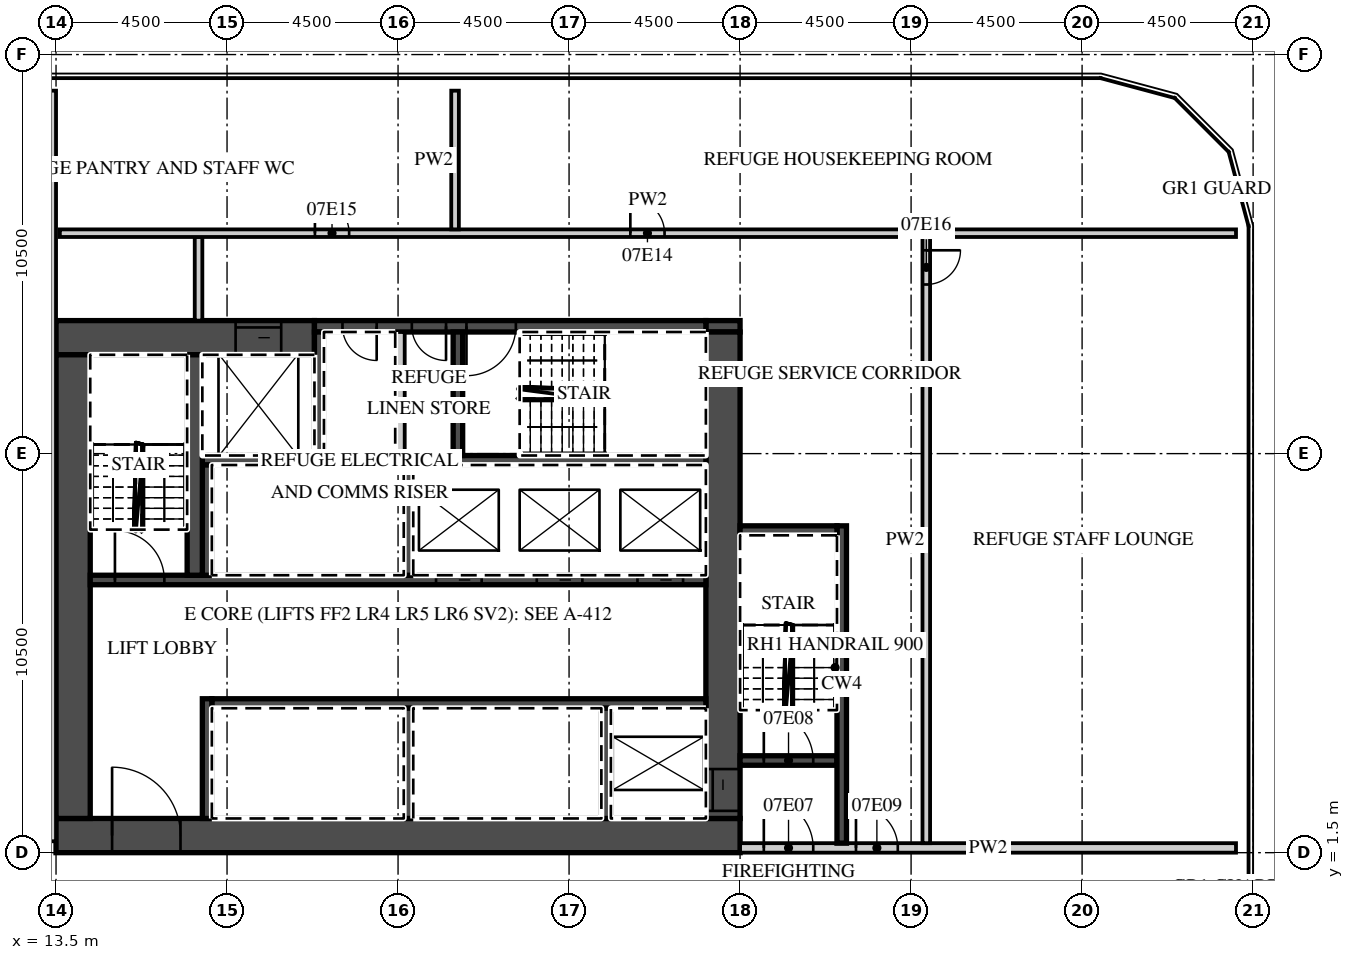
"""IFC4 building model, lengths in metres.
Left out: names, types, materials, properties, quantities, classifications, styles, units other than length and angle.
Written with IfcOpenShell. Run it as: python <this file> out.ifc"""

import sys

from ifc_helpers import new_model, si_unit, direction, frame, frame_2d, origin, place, context, subcontext, project, spatial, rectangle, extrude, element, fill, save


model = new_model("IFC4")
c1 = context("Model", 3, precision=1e-05, world=origin(), true_north=direction((0.0, 1.0)))
c2 = subcontext(c1, "Body", "Model", "MODEL_VIEW")
j1 = project(units=[si_unit("LENGTHUNIT", "METRE"), si_unit("PLANEANGLEUNIT", "RADIAN")], contexts=[c1])
p1 = place(None, origin())
s1 = spatial("IfcSite", under=j1, at=p1, CompositionType="ELEMENT")
p2 = place(p1, origin())
s2 = spatial("IfcBuilding", under=s1, at=p2, CompositionType="ELEMENT")
p3 = place(p2, frame((0.0, 0.0, 47.0)))
s3 = spatial("IfcBuildingStorey", under=s2, at=p3, CompositionType="ELEMENT", Elevation=47.0)
p4 = place(p3, frame((13.5, 1.95, 0.0), z_axis=(0.0, 0.0, 1.0), x_axis=(1.0, 0.0, 0.0)))
e1 = element("IfcWall", 1, at=p4, inside=s3, PredefinedType="SHEAR", context=c2, shape_type="SweptSolid", body=[
    extrude(rectangle(XDim=18.0, YDim=0.9, at=frame_2d((9.0, 0.0))), origin(), (0.0, 0.0, 1.0), 5.6),
])
p5 = place(p4, frame((1.475, 0.0, 0.0)))
e2 = element("IfcOpeningElement", 2, at=p5, cuts=e1, PredefinedType="OPENING", context=c2, shape_type="SweptSolid", body=[
    extrude(rectangle(XDim=1.8, YDim=2.1, at=frame_2d((0.9, 1.05))), frame((0.0, 0.46, 0.0), z_axis=(0.0, -1.0, 0.0), x_axis=(1.0, 0.0, 0.0)), (0.0, 0.0, 1.0), 0.92),
])
p6 = place(p3, frame((13.5, 15.05, 0.0), z_axis=(0.0, 0.0, 1.0), x_axis=(1.0, 0.0, 0.0)))
e3 = element("IfcWall", 3, at=p6, inside=s3, PredefinedType="SHEAR", context=c2, shape_type="SweptSolid", body=[
    extrude(rectangle(XDim=6.8, YDim=0.9, at=frame_2d((3.4, 0.0))), origin(), (0.0, 0.0, 1.0), 5.6),
])
p7 = place(p6, frame((4.725, 0.0, 0.0)))
e4 = element("IfcOpeningElement", 4, at=p7, cuts=e3, PredefinedType="OPENING", context=c2, shape_type="SweptSolid", body=[
    extrude(rectangle(XDim=1.2, YDim=2.1, at=frame_2d((0.6, 1.05))), frame((0.0, 0.46, 0.0), z_axis=(0.0, -1.0, 0.0), x_axis=(1.0, 0.0, 0.0)), (0.0, 0.0, 1.0), 0.92),
])
p8 = place(p3, frame((30.6, 15.35, 0.0), z_axis=(0.0, 0.0, 1.0), x_axis=(1.0, 0.0, 0.0)))
e5 = element("IfcWall", 5, at=p8, inside=s3, PredefinedType="SHEAR", context=c2, shape_type="SweptSolid", body=[
    extrude(rectangle(XDim=0.9, YDim=0.3, at=frame_2d((0.45, 0.0))), origin(), (0.0, 0.0, 1.0), 5.6),
])
p9 = place(p3, frame((20.3, 15.35, 0.0), z_axis=(0.0, 0.0, 1.0), x_axis=(1.0, 0.0, 0.0)))
e6 = element("IfcWall", 6, at=p9, inside=s3, PredefinedType="SHEAR", context=c2, shape_type="SweptSolid", body=[
    extrude(rectangle(XDim=10.3, YDim=0.3, at=frame_2d((5.15, 0.0))), origin(), (0.0, 0.0, 1.0), 5.6),
])
p10 = place(p9, frame((4.0, 0.0, 0.0)))
e7 = element("IfcOpeningElement", 7, at=p10, cuts=e6, PredefinedType="OPENING", context=c2, shape_type="SweptSolid", body=[
    extrude(rectangle(XDim=1.3, YDim=2.1, at=frame_2d((0.65, 1.05))), frame((0.0, 0.16, 0.0), z_axis=(0.0, -1.0, 0.0), x_axis=(1.0, 0.0, 0.0)), (0.0, 0.0, 1.0), 0.32),
])
p11 = place(p9, frame((2.562, 0.0, 0.0)))
e8 = element("IfcOpeningElement", 8, at=p11, cuts=e6, PredefinedType="OPENING", context=c2, shape_type="SweptSolid", body=[
    extrude(rectangle(XDim=0.9, YDim=2.1, at=frame_2d((0.45, 1.05))), frame((0.0, 0.16, 0.0), z_axis=(0.0, -1.0, 0.0), x_axis=(1.0, 0.0, 0.0)), (0.0, 0.0, 1.0), 0.32),
])
p12 = place(p9, frame((0.738, 0.0, 0.0)))
e9 = element("IfcOpeningElement", 9, at=p12, cuts=e6, PredefinedType="OPENING", context=c2, shape_type="SweptSolid", body=[
    extrude(rectangle(XDim=0.9, YDim=2.1, at=frame_2d((0.45, 1.05))), frame((0.0, 0.16, 0.0), z_axis=(0.0, -1.0, 0.0), x_axis=(1.0, 0.0, 0.0)), (0.0, 0.0, 1.0), 0.32),
])
p13 = place(p3, frame((31.05, 2.4, 0.0), z_axis=(0.0, 0.0, 1.0), x_axis=(0.0, 1.0, 0.0)))
e10 = element("IfcWall", 10, at=p13, inside=s3, PredefinedType="SHEAR", context=c2, shape_type="SweptSolid", body=[
    extrude(rectangle(XDim=12.8, YDim=0.9, at=frame_2d((6.4, 0.0))), origin(), (0.0, 0.0, 1.0), 5.6),
])
p14 = place(p13, frame((0.2, 0.0, 0.0)))
e11 = element("IfcOpeningElement", 11, at=p14, cuts=e10, PredefinedType="OPENING", context=c2, shape_type="SweptSolid", body=[
    extrude(rectangle(XDim=1.1, YDim=2.1, at=frame_2d((0.55, 1.05))), frame((0.0, 0.46, 0.0), z_axis=(0.0, -1.0, 0.0), x_axis=(1.0, 0.0, 0.0)), (0.0, 0.0, 1.0), 0.92),
])
p15 = place(p3, frame((13.95, 2.4, 0.0), z_axis=(0.0, 0.0, 1.0), x_axis=(0.0, 1.0, 0.0)))
e12 = element("IfcWall", 12, at=p15, inside=s3, PredefinedType="SHEAR", context=c2, shape_type="SweptSolid", body=[
    extrude(rectangle(XDim=12.2, YDim=0.9, at=frame_2d((6.1, 0.0))), origin(), (0.0, 0.0, 1.0), 5.6),
])
p16 = place(p3, frame((17.6, 5.425, 0.0), z_axis=(0.0, 0.0, 1.0), x_axis=(1.0, 0.0, 0.0)))
e13 = element("IfcWall", 13, at=p16, inside=s3, PredefinedType="SHEAR", context=c2, shape_type="SweptSolid", body=[
    extrude(rectangle(XDim=13.0, YDim=0.25, at=frame_2d((6.5, 0.0))), origin(), (0.0, 0.0, 1.0), 5.6),
])
p17 = place(p3, frame((17.475, 2.4, 0.0), z_axis=(0.0, 0.0, 1.0), x_axis=(0.0, 1.0, 0.0)))
e14 = element("IfcWall", 14, at=p17, inside=s3, PredefinedType="SHEAR", context=c2, shape_type="SweptSolid", body=[
    extrude(rectangle(XDim=3.15, YDim=0.25, at=frame_2d((1.575, 0.0))), origin(), (0.0, 0.0, 1.0), 5.6),
])
for number, where, z_axis, x_axis in (
    (15, (27.975, 2.4, 0.0), (0.0, 0.0, 1.0), (0.0, 1.0, 0.0)),
    (16, (22.775, 2.4, 0.0), (0.0, 0.0, 1.0), (0.0, 1.0, 0.0)),
):
    element("IfcWall", number, at=place(p3, frame(where, z_axis=z_axis, x_axis=x_axis)), inside=s3, PredefinedType="SHEAR", context=c2, shape_type="SweptSolid", body=[
        extrude(rectangle(XDim=2.9, YDim=0.25, at=frame_2d((1.45, 0.0))), origin(), (0.0, 0.0, 1.0), 5.6),
    ])
p18 = place(p3, frame((14.4, 8.675, 0.0), z_axis=(0.0, 0.0, 1.0), x_axis=(1.0, 0.0, 0.0)))
e17 = element("IfcWall", 17, at=p18, inside=s3, PredefinedType="SHEAR", context=c2, shape_type="SweptSolid", body=[
    extrude(rectangle(XDim=16.2, YDim=0.25, at=frame_2d((8.1, 0.0))), origin(), (0.0, 0.0, 1.0), 5.6),
])
p19 = place(p18, frame((14.4, 0.0, 0.0)))
e18 = element("IfcOpeningElement", 18, at=p19, cuts=e17, PredefinedType="OPENING", context=c2, shape_type="SweptSolid", body=[
    extrude(rectangle(XDim=1.2, YDim=2.1, at=frame_2d((0.6, 1.05))), frame((0.0, 0.135, 0.0), z_axis=(0.0, -1.0, 0.0), x_axis=(1.0, 0.0, 0.0)), (0.0, 0.0, 1.0), 0.27),
])
p20 = place(p18, frame((11.75, 0.0, 0.0)))
e19 = element("IfcOpeningElement", 19, at=p20, cuts=e17, PredefinedType="OPENING", context=c2, shape_type="SweptSolid", body=[
    extrude(rectangle(XDim=1.2, YDim=2.1, at=frame_2d((0.6, 1.05))), frame((0.0, 0.135, 0.0), z_axis=(0.0, -1.0, 0.0), x_axis=(1.0, 0.0, 0.0)), (0.0, 0.0, 1.0), 0.27),
])
p21 = place(p18, frame((9.1, 0.0, 0.0)))
e20 = element("IfcOpeningElement", 20, at=p21, cuts=e17, PredefinedType="OPENING", context=c2, shape_type="SweptSolid", body=[
    extrude(rectangle(XDim=1.2, YDim=2.1, at=frame_2d((0.6, 1.05))), frame((0.0, 0.135, 0.0), z_axis=(0.0, -1.0, 0.0), x_axis=(1.0, 0.0, 0.0)), (0.0, 0.0, 1.0), 0.27),
])
p22 = place(p18, frame((0.65, 0.0, 0.0)))
e21 = element("IfcOpeningElement", 21, at=p22, cuts=e17, PredefinedType="OPENING", context=c2, shape_type="SweptSolid", body=[
    extrude(rectangle(XDim=1.3, YDim=2.1, at=frame_2d((0.65, 1.05))), frame((0.0, 0.135, 0.0), z_axis=(0.0, -1.0, 0.0), x_axis=(1.0, 0.0, 0.0)), (0.0, 0.0, 1.0), 0.27),
])
p23 = place(p3, frame((17.35, 11.825, 0.0), z_axis=(0.0, 0.0, 1.0), x_axis=(1.0, 0.0, 0.0)))
e22 = element("IfcWall", 22, at=p23, inside=s3, PredefinedType="SHEAR", context=c2, shape_type="SweptSolid", body=[
    extrude(rectangle(XDim=13.25, YDim=0.25, at=frame_2d((6.625, 0.0))), origin(), (0.0, 0.0, 1.0), 5.6),
])
for number, where, z_axis, x_axis in (
    (23, (17.475, 8.8, 0.0), (0.0, 0.0, 1.0), (0.0, 1.0, 0.0)),
    (24, (22.775, 8.8, 0.0), (0.0, 0.0, 1.0), (0.0, 1.0, 0.0)),
):
    element("IfcWall", number, at=place(p3, frame(where, z_axis=z_axis, x_axis=x_axis)), inside=s3, PredefinedType="SHEAR", context=c2, shape_type="SweptSolid", body=[
        extrude(rectangle(XDim=2.9, YDim=0.25, at=frame_2d((1.45, 0.0))), origin(), (0.0, 0.0, 1.0), 5.6),
    ])
p24 = place(p3, frame((17.15, 8.8, 0.0), z_axis=(0.0, 0.0, 1.0), x_axis=(0.0, 1.0, 0.0)))
e25 = element("IfcWall", 25, at=p24, inside=s3, PredefinedType="SHEAR", context=c2, shape_type="SweptSolid", body=[
    extrude(rectangle(XDim=5.8, YDim=0.4, at=frame_2d((2.9, 0.0))), origin(), (0.0, 0.0, 1.0), 5.6),
])
for number, where, z_axis, x_axis in (
    (26, (20.425, 11.95, 0.0), (0.0, 0.0, 1.0), (0.0, 1.0, 0.0)),
    (27, (24.075, 11.95, 0.0), (0.0, 0.0, 1.0), (0.0, 1.0, 0.0)),
):
    element("IfcWall", number, at=place(p3, frame(where, z_axis=z_axis, x_axis=x_axis)), inside=s3, PredefinedType="SHEAR", context=c2, shape_type="SweptSolid", body=[
        extrude(rectangle(XDim=3.25, YDim=0.25, at=frame_2d((1.625, 0.0))), origin(), (0.0, 0.0, 1.0), 5.6),
    ])
p25 = place(p3, frame((22.55, 11.95, 0.0), z_axis=(0.0, 0.0, 1.0), x_axis=(0.0, 1.0, 0.0)))
e28 = element("IfcWall", 28, at=p25, inside=s3, PredefinedType="PARTITIONING", context=c2, shape_type="SweptSolid", body=[
    extrude(rectangle(XDim=3.25, YDim=0.25, at=frame_2d((1.625, 0.0))), origin(), (0.0, 0.0, 1.0), 5.6),
])
p26 = place(p3, frame((31.5, 1.625, 0.0), z_axis=(0.0, 0.0, 1.0), x_axis=(1.0, 0.0, 0.0)))
e29 = element("IfcWall", 29, at=p26, inside=s3, PredefinedType="PARTITIONING", context=c2, shape_type="SweptSolid", body=[
    extrude(rectangle(XDim=13.05, YDim=0.25, at=frame_2d((6.525, 0.0))), origin(), (0.0, 0.0, 1.0), 5.6),
])
p27 = place(p26, frame((0.625, 0.0, 0.0)))
e30 = element("IfcOpeningElement", 30, at=p27, cuts=e29, PredefinedType="OPENING", context=c2, shape_type="SweptSolid", body=[
    extrude(rectangle(XDim=1.3, YDim=2.1, at=frame_2d((0.65, 1.05))), frame((0.0, 0.135, 0.0), z_axis=(0.0, -1.0, 0.0), x_axis=(1.0, 0.0, 0.0)), (0.0, 0.0, 1.0), 0.27),
])
p28 = place(p26, frame((3.05, 0.0, 0.0)))
e31 = element("IfcOpeningElement", 31, at=p28, cuts=e29, PredefinedType="OPENING", context=c2, shape_type="SweptSolid", body=[
    extrude(rectangle(XDim=1.1, YDim=2.1, at=frame_2d((0.55, 1.05))), frame((0.0, 0.135, 0.0), z_axis=(0.0, -1.0, 0.0), x_axis=(1.0, 0.0, 0.0)), (0.0, 0.0, 1.0), 0.27),
])
p29 = place(p3, frame((31.5, 3.925, 0.0), z_axis=(0.0, 0.0, 1.0), x_axis=(1.0, 0.0, 0.0)))
e32 = element("IfcWall", 32, at=p29, inside=s3, PredefinedType="SHEAR", context=c2, shape_type="SweptSolid", body=[
    extrude(rectangle(XDim=2.55, YDim=0.25, at=frame_2d((1.275, 0.0))), origin(), (0.0, 0.0, 1.0), 5.6),
])
p30 = place(p29, frame((0.625, 0.0, 0.0)))
e33 = element("IfcOpeningElement", 33, at=p30, cuts=e32, PredefinedType="OPENING", context=c2, shape_type="SweptSolid", body=[
    extrude(rectangle(XDim=1.3, YDim=2.1, at=frame_2d((0.65, 1.05))), frame((0.0, 0.135, 0.0), z_axis=(0.0, -1.0, 0.0), x_axis=(1.0, 0.0, 0.0)), (0.0, 0.0, 1.0), 0.27),
])
p31 = place(p3, frame((34.175, 1.75, 0.0), z_axis=(0.0, 0.0, 1.0), x_axis=(0.0, 1.0, 0.0)))
e34 = element("IfcWall", 34, at=p31, inside=s3, PredefinedType="SHEAR", context=c2, shape_type="SweptSolid", body=[
    extrude(rectangle(XDim=8.35, YDim=0.25, at=frame_2d((4.175, 0.0))), origin(), (0.0, 0.0, 1.0), 5.6),
])
p32 = place(p3, frame((31.5, 9.975, 0.0), z_axis=(0.0, 0.0, 1.0), x_axis=(1.0, 0.0, 0.0)))
e35 = element("IfcWall", 35, at=p32, inside=s3, PredefinedType="SHEAR", context=c2, shape_type="SweptSolid", body=[
    extrude(rectangle(XDim=2.55, YDim=0.25, at=frame_2d((1.275, 0.0))), origin(), (0.0, 0.0, 1.0), 5.6),
])
p33 = place(p3, frame((17.25, 15.5, 0.0), z_axis=(0.0, 0.0, 1.0), x_axis=(0.0, 1.0, 0.0)))
e36 = element("IfcWall", 36, at=p33, inside=s3, PredefinedType="PARTITIONING", context=c2, shape_type="SweptSolid", body=[
    extrude(rectangle(XDim=2.2, YDim=0.2, at=frame_2d((1.1, 0.0))), origin(), (0.0, 0.0, 1.0), 5.6),
])
p34 = place(p3, frame((36.4, 1.75, 0.0), z_axis=(0.0, 0.0, 1.0), x_axis=(0.0, 1.0, 0.0)))
e37 = element("IfcWall", 37, at=p34, inside=s3, PredefinedType="PARTITIONING", context=c2, shape_type="SweptSolid", body=[
    extrude(rectangle(XDim=15.95, YDim=0.2, at=frame_2d((7.975, 0.0))), origin(), (0.0, 0.0, 1.0), 5.6),
])
p35 = place(p34, frame((14.7, 0.0, 0.0)))
e38 = element("IfcOpeningElement", 38, at=p35, cuts=e37, PredefinedType="OPENING", context=c2, shape_type="SweptSolid", body=[
    extrude(rectangle(XDim=0.9, YDim=2.1, at=frame_2d((0.45, 1.05))), frame((0.0, 0.11, 0.0), z_axis=(0.0, -1.0, 0.0), x_axis=(1.0, 0.0, 0.0)), (0.0, 0.0, 1.0), 0.22),
])
p36 = place(p3, frame((13.6, 17.8, 0.0), z_axis=(0.0, 0.0, 1.0), x_axis=(1.0, 0.0, 0.0)))
e39 = element("IfcWall", 39, at=p36, inside=s3, PredefinedType="PARTITIONING", context=c2, shape_type="SweptSolid", body=[
    extrude(rectangle(XDim=30.95, YDim=0.2, at=frame_2d((15.475, 0.0))), origin(), (0.0, 0.0, 1.0), 5.6),
])
p37 = place(p36, frame((15.012, 0.0, 0.0)))
e40 = element("IfcOpeningElement", 40, at=p37, cuts=e39, PredefinedType="OPENING", context=c2, shape_type="SweptSolid", body=[
    extrude(rectangle(XDim=0.9, YDim=2.1, at=frame_2d((0.45, 1.05))), frame((0.0, 0.11, 0.0), z_axis=(0.0, -1.0, 0.0), x_axis=(1.0, 0.0, 0.0)), (0.0, 0.0, 1.0), 0.22),
])
p38 = place(p36, frame((6.712, 0.0, 0.0)))
e41 = element("IfcOpeningElement", 41, at=p38, cuts=e39, PredefinedType="OPENING", context=c2, shape_type="SweptSolid", body=[
    extrude(rectangle(XDim=0.9, YDim=2.1, at=frame_2d((0.45, 1.05))), frame((0.0, 0.11, 0.0), z_axis=(0.0, -1.0, 0.0), x_axis=(1.0, 0.0, 0.0)), (0.0, 0.0, 1.0), 0.22),
])
p39 = place(p3, frame((24.0, 17.9, 0.0), z_axis=(0.0, 0.0, 1.0), x_axis=(0.0, 1.0, 0.0)))
e42 = element("IfcWall", 42, at=p39, inside=s3, PredefinedType="PARTITIONING", context=c2, shape_type="SweptSolid", body=[
    extrude(rectangle(XDim=3.65, YDim=0.2, at=frame_2d((1.825, 0.0))), origin(), (0.0, 0.0, 1.0), 5.6),
])
p40 = place(p3, frame((13.4, 1.8, 0.0), z_axis=(0.0, 0.0, 1.0), x_axis=(0.0, 1.0, 0.0)))
e43 = element("IfcWall", 43, at=p40, inside=s3, PredefinedType="PARTITIONING", context=c2, shape_type="SweptSolid", body=[
    extrude(rectangle(XDim=19.75, YDim=0.2, at=frame_2d((9.875, 0.0))), origin(), (0.0, 0.0, 1.0), 5.6),
])
p41 = place(p19, origin())
e44 = element("IfcDoor", 44, at=p41, inside=s3, OperationType="SLIDING_TO_LEFT", PredefinedType="DOOR", context=c2, shape_type="SweptSolid", body=[
    extrude(rectangle(XDim=1.2, YDim=2.1, at=frame_2d((0.6, 1.05))), frame((0.0, 0.025, 0.0), z_axis=(0.0, -1.0, 0.0), x_axis=(1.0, 0.0, 0.0)), (0.0, 0.0, 1.0), 0.05),
])
fill(e18, e44)
p42 = place(p20, origin())
e45 = element("IfcDoor", 45, at=p42, inside=s3, OperationType="SLIDING_TO_RIGHT", PredefinedType="DOOR", context=c2, shape_type="SweptSolid", body=[
    extrude(rectangle(XDim=1.2, YDim=2.1, at=frame_2d((0.6, 1.05))), frame((0.0, 0.025, 0.0), z_axis=(0.0, -1.0, 0.0), x_axis=(1.0, 0.0, 0.0)), (0.0, 0.0, 1.0), 0.05),
])
fill(e19, e45)
p43 = place(p21, origin())
e46 = element("IfcDoor", 46, at=p43, inside=s3, OperationType="SLIDING_TO_RIGHT", PredefinedType="DOOR", context=c2, shape_type="SweptSolid", body=[
    extrude(rectangle(XDim=1.2, YDim=2.1, at=frame_2d((0.6, 1.05))), frame((0.0, 0.025, 0.0), z_axis=(0.0, -1.0, 0.0), x_axis=(1.0, 0.0, 0.0)), (0.0, 0.0, 1.0), 0.05),
])
fill(e20, e46)
p44 = place(p7, origin())
e47 = element("IfcDoor", 47, at=p44, inside=s3, OperationType="SLIDING_TO_LEFT", PredefinedType="DOOR", context=c2, shape_type="SweptSolid", body=[
    extrude(rectangle(XDim=1.2, YDim=2.1, at=frame_2d((0.6, 1.05))), frame((0.0, 0.025, 0.0), z_axis=(0.0, -1.0, 0.0), x_axis=(1.0, 0.0, 0.0)), (0.0, 0.0, 1.0), 0.05),
])
fill(e4, e47)
p45 = place(p14, origin())
e48 = element("IfcDoor", 48, at=p45, inside=s3, OperationType="SLIDING_TO_LEFT", PredefinedType="DOOR", context=c2, shape_type="SweptSolid", body=[
    extrude(rectangle(XDim=1.1, YDim=2.1, at=frame_2d((0.55, 1.05))), frame((0.0, 0.025, 0.0), z_axis=(0.0, -1.0, 0.0), x_axis=(1.0, 0.0, 0.0)), (0.0, 0.0, 1.0), 0.05),
])
fill(e11, e48)
p46 = place(p5, origin())
e49 = element("IfcDoor", 49, at=p46, inside=s3, OperationType="DOUBLE_DOOR_DOUBLE_SWING", PredefinedType="DOOR", context=c2, shape_type="SweptSolid", body=[
    extrude(rectangle(XDim=1.8, YDim=2.1, at=frame_2d((0.9, 1.05))), frame((0.0, 0.025, 0.0), z_axis=(0.0, -1.0, 0.0), x_axis=(1.0, 0.0, 0.0)), (0.0, 0.0, 1.0), 0.05),
])
fill(e2, e49)
p47 = place(p27, origin())
e50 = element("IfcDoor", 50, at=p47, inside=s3, OperationType="SINGLE_SWING_LEFT", PredefinedType="DOOR", context=c2, shape_type="SweptSolid", body=[
    extrude(rectangle(XDim=1.3, YDim=2.1, at=frame_2d((0.65, 1.05))), frame((0.0, 0.025, 0.0), z_axis=(0.0, -1.0, 0.0), x_axis=(1.0, 0.0, 0.0)), (0.0, 0.0, 1.0), 0.05),
])
fill(e30, e50)
p48 = place(p30, origin())
e51 = element("IfcDoor", 51, at=p48, inside=s3, OperationType="SINGLE_SWING_LEFT", PredefinedType="DOOR", context=c2, shape_type="SweptSolid", body=[
    extrude(rectangle(XDim=1.3, YDim=2.1, at=frame_2d((0.65, 1.05))), frame((0.0, 0.025, 0.0), z_axis=(0.0, -1.0, 0.0), x_axis=(1.0, 0.0, 0.0)), (0.0, 0.0, 1.0), 0.05),
])
fill(e33, e51)
p49 = place(p28, origin())
e52 = element("IfcDoor", 52, at=p49, inside=s3, OperationType="SINGLE_SWING_LEFT", PredefinedType="DOOR", context=c2, shape_type="SweptSolid", body=[
    extrude(rectangle(XDim=1.1, YDim=2.1, at=frame_2d((0.55, 1.05))), frame((0.0, 0.025, 0.0), z_axis=(0.0, -1.0, 0.0), x_axis=(1.0, 0.0, 0.0)), (0.0, 0.0, 1.0), 0.05),
])
fill(e31, e52)
p50 = place(p22, origin())
e53 = element("IfcDoor", 53, at=p50, inside=s3, OperationType="SINGLE_SWING_LEFT", PredefinedType="DOOR", context=c2, shape_type="SweptSolid", body=[
    extrude(rectangle(XDim=1.3, YDim=2.1, at=frame_2d((0.65, 1.05))), frame((0.0, 0.025, 0.0), z_axis=(0.0, -1.0, 0.0), x_axis=(1.0, 0.0, 0.0)), (0.0, 0.0, 1.0), 0.05),
])
fill(e21, e53)
p51 = place(p10, origin())
e54 = element("IfcDoor", 54, at=p51, inside=s3, OperationType="SINGLE_SWING_LEFT", PredefinedType="DOOR", context=c2, shape_type="SweptSolid", body=[
    extrude(rectangle(XDim=1.3, YDim=2.1, at=frame_2d((0.65, 1.05))), frame((0.0, 0.025, 0.0), z_axis=(0.0, -1.0, 0.0), x_axis=(1.0, 0.0, 0.0)), (0.0, 0.0, 1.0), 0.05),
])
fill(e7, e54)
p52 = place(p11, origin())
e55 = element("IfcDoor", 55, at=p52, inside=s3, OperationType="SINGLE_SWING_RIGHT", PredefinedType="DOOR", context=c2, shape_type="SweptSolid", body=[
    extrude(rectangle(XDim=0.9, YDim=2.1, at=frame_2d((0.45, 1.05))), frame((0.0, 0.025, 0.0), z_axis=(0.0, -1.0, 0.0), x_axis=(1.0, 0.0, 0.0)), (0.0, 0.0, 1.0), 0.05),
])
fill(e8, e55)
p53 = place(p12, origin())
e56 = element("IfcDoor", 56, at=p53, inside=s3, OperationType="SINGLE_SWING_RIGHT", PredefinedType="DOOR", context=c2, shape_type="SweptSolid", body=[
    extrude(rectangle(XDim=0.9, YDim=2.1, at=frame_2d((0.45, 1.05))), frame((0.0, 0.025, 0.0), z_axis=(0.0, -1.0, 0.0), x_axis=(1.0, 0.0, 0.0)), (0.0, 0.0, 1.0), 0.05),
])
fill(e9, e56)
p54 = place(p37, origin())
e57 = element("IfcDoor", 57, at=p54, inside=s3, OperationType="SINGLE_SWING_LEFT", PredefinedType="DOOR", context=c2, shape_type="SweptSolid", body=[
    extrude(rectangle(XDim=0.9, YDim=2.1, at=frame_2d((0.45, 1.05))), frame((0.0, 0.025, 0.0), z_axis=(0.0, -1.0, 0.0), x_axis=(1.0, 0.0, 0.0)), (0.0, 0.0, 1.0), 0.05),
])
fill(e40, e57)
p55 = place(p38, origin())
e58 = element("IfcDoor", 58, at=p55, inside=s3, OperationType="SINGLE_SWING_LEFT", PredefinedType="DOOR", context=c2, shape_type="SweptSolid", body=[
    extrude(rectangle(XDim=0.9, YDim=2.1, at=frame_2d((0.45, 1.05))), frame((0.0, 0.025, 0.0), z_axis=(0.0, -1.0, 0.0), x_axis=(1.0, 0.0, 0.0)), (0.0, 0.0, 1.0), 0.05),
])
fill(e41, e58)
p56 = place(p35, origin())
e59 = element("IfcDoor", 59, at=p56, inside=s3, OperationType="SINGLE_SWING_RIGHT", PredefinedType="DOOR", context=c2, shape_type="SweptSolid", body=[
    extrude(rectangle(XDim=0.9, YDim=2.1, at=frame_2d((0.45, 1.05))), frame((0.0, 0.025, 0.0), z_axis=(0.0, -1.0, 0.0), x_axis=(1.0, 0.0, 0.0)), (0.0, 0.0, 1.0), 0.05),
])
fill(e38, e59)
save(model, sys.argv[1])
